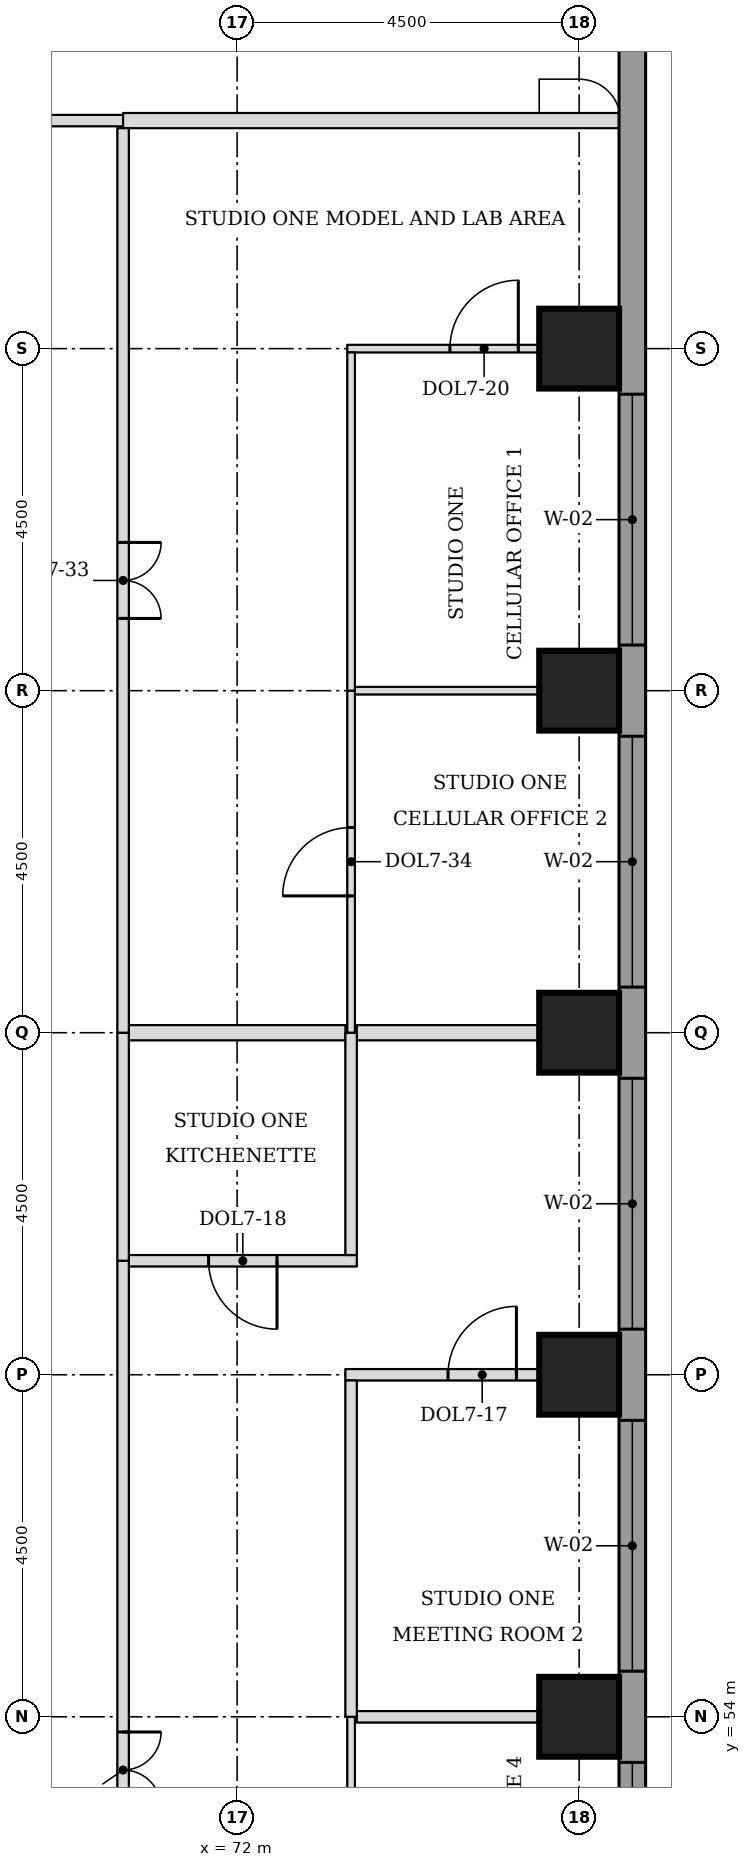
"""IFC4 building model, lengths in metres.
Left out: names, types, materials, properties, quantities, classifications, styles, units other than length and angle.
Written with IfcOpenShell. Run it as: python <this file> out.ifc"""

import sys

from ifc_helpers import new_model, si_unit, direction, frame, frame_2d, origin, origin_2d, place, context, subcontext, project, spatial, rectangle, extrude, element, fill, save


model = new_model("IFC4")
c1 = context("Model", 3, precision=1e-05, world=origin(), true_north=direction((0.0, 1.0)))
c2 = subcontext(c1, "Body", "Model", "MODEL_VIEW")
j1 = project(units=[si_unit("LENGTHUNIT", "METRE"), si_unit("PLANEANGLEUNIT", "RADIAN")], contexts=[c1])
p1 = place(None, origin())
s1 = spatial("IfcSite", under=j1, at=p1, CompositionType="ELEMENT")
p2 = place(p1, origin())
s2 = spatial("IfcBuilding", under=s1, at=p2, CompositionType="ELEMENT")
p3 = place(p2, frame((0.0, 0.0, 130.7)))
s3 = spatial("IfcBuildingStorey", under=s2, at=p3, CompositionType="ELEMENT", Elevation=130.7)
for number, where, z_axis, x_axis in (
    (1, (76.5, 54.0, 0.0), (0.0, 0.0, 1.0), (1.0, 0.0, 0.0)),
    (2, (76.5, 58.5, 0.0), (0.0, 0.0, 1.0), (1.0, 0.0, 0.0)),
    (3, (76.5, 63.0, 0.0), (0.0, 0.0, 1.0), (1.0, 0.0, 0.0)),
    (4, (76.5, 67.5, 0.0), (0.0, 0.0, 1.0), (1.0, 0.0, 0.0)),
    (5, (76.5, 72.0, 0.0), (0.0, 0.0, 1.0), (1.0, 0.0, 0.0)),
):
    element("IfcColumn", number, at=place(p3, frame(where, z_axis=z_axis, x_axis=x_axis)), inside=s3, PredefinedType="COLUMN", context=c2, shape_type="SweptSolid", body=[
        extrude(rectangle(XDim=1.05, YDim=1.05, at=origin_2d()), origin(), (0.0, 0.0, 1.0), 3.7),
    ])
p4 = place(p3, frame((77.2, 44.638, 0.0), z_axis=(0.0, 0.0, 1.0), x_axis=(0.0, 1.0, 0.0)))
e6 = element("IfcWall", 6, at=p4, inside=s3, PredefinedType="STANDARD", context=c2, shape_type="SweptSolid", body=[
    extrude(rectangle(XDim=32.225, YDim=0.35, at=frame_2d((16.112, 0.0))), origin(), (0.0, 0.0, 1.0), 3.525),
])
p5 = place(p4, frame((5.462, 0.0, 0.9)))
e7 = element("IfcOpeningElement", 7, at=p5, cuts=e6, PredefinedType="OPENING", context=c2, shape_type="SweptSolid", body=[
    extrude(rectangle(XDim=3.3, YDim=1.9, at=frame_2d((1.65, 0.95))), frame((0.0, 0.185, 0.0), z_axis=(0.0, -1.0, 0.0), x_axis=(1.0, 0.0, 0.0)), (0.0, 0.0, 1.0), 0.37),
])
p6 = place(p4, frame((9.962, 0.0, 0.9)))
e8 = element("IfcOpeningElement", 8, at=p6, cuts=e6, PredefinedType="OPENING", context=c2, shape_type="SweptSolid", body=[
    extrude(rectangle(XDim=3.3, YDim=1.9, at=frame_2d((1.65, 0.95))), frame((0.0, 0.185, 0.0), z_axis=(0.0, -1.0, 0.0), x_axis=(1.0, 0.0, 0.0)), (0.0, 0.0, 1.0), 0.37),
])
p7 = place(p4, frame((14.462, 0.0, 0.9)))
e9 = element("IfcOpeningElement", 9, at=p7, cuts=e6, PredefinedType="OPENING", context=c2, shape_type="SweptSolid", body=[
    extrude(rectangle(XDim=3.3, YDim=1.9, at=frame_2d((1.65, 0.95))), frame((0.0, 0.185, 0.0), z_axis=(0.0, -1.0, 0.0), x_axis=(1.0, 0.0, 0.0)), (0.0, 0.0, 1.0), 0.37),
])
p8 = place(p4, frame((18.962, 0.0, 0.9)))
e10 = element("IfcOpeningElement", 10, at=p8, cuts=e6, PredefinedType="OPENING", context=c2, shape_type="SweptSolid", body=[
    extrude(rectangle(XDim=3.3, YDim=1.9, at=frame_2d((1.65, 0.95))), frame((0.0, 0.185, 0.0), z_axis=(0.0, -1.0, 0.0), x_axis=(1.0, 0.0, 0.0)), (0.0, 0.0, 1.0), 0.37),
])
p9 = place(p4, frame((23.462, 0.0, 0.9)))
e11 = element("IfcOpeningElement", 11, at=p9, cuts=e6, PredefinedType="OPENING", context=c2, shape_type="SweptSolid", body=[
    extrude(rectangle(XDim=3.3, YDim=1.9, at=frame_2d((1.65, 0.95))), frame((0.0, 0.185, 0.0), z_axis=(0.0, -1.0, 0.0), x_axis=(1.0, 0.0, 0.0)), (0.0, 0.0, 1.0), 0.37),
])
p10 = place(p3, frame((73.575, 54.0, 0.0), z_axis=(0.0, 0.0, 1.0), x_axis=(1.0, 0.0, 0.0)))
e12 = element("IfcWall", 12, at=p10, inside=s3, PredefinedType="PARTITIONING", context=c2, shape_type="SweptSolid", body=[
    extrude(rectangle(XDim=3.45, YDim=0.15, at=frame_2d((1.725, 0.0))), origin(), (0.0, 0.0, 1.0), 3.55),
])
p11 = place(p3, frame((73.425, 58.5, 0.0), z_axis=(0.0, 0.0, 1.0), x_axis=(1.0, 0.0, 0.0)))
e13 = element("IfcWall", 13, at=p11, inside=s3, PredefinedType="PARTITIONING", context=c2, shape_type="SweptSolid", body=[
    extrude(rectangle(XDim=3.6, YDim=0.15, at=frame_2d((1.8, 0.0))), origin(), (0.0, 0.0, 1.0), 3.55),
])
p12 = place(p11, frame((1.35, 0.0, 0.0)))
e14 = element("IfcOpeningElement", 14, at=p12, cuts=e13, PredefinedType="OPENING", context=c2, shape_type="SweptSolid", body=[
    extrude(rectangle(XDim=0.9, YDim=2.1, at=frame_2d((0.45, 1.05))), frame((0.0, 0.085, 0.0), z_axis=(0.0, -1.0, 0.0), x_axis=(1.0, 0.0, 0.0)), (0.0, 0.0, 1.0), 0.17),
])
p13 = place(p3, frame((70.575, 60.0, 0.0), z_axis=(0.0, 0.0, 1.0), x_axis=(1.0, 0.0, 0.0)))
e15 = element("IfcWall", 15, at=p13, inside=s3, PredefinedType="PARTITIONING", context=c2, shape_type="SweptSolid", body=[
    extrude(rectangle(XDim=3.0, YDim=0.15, at=frame_2d((1.5, 0.0))), origin(), (0.0, 0.0, 1.0), 3.55),
])
p14 = place(p13, frame((1.05, 0.0, 0.0)))
e16 = element("IfcOpeningElement", 16, at=p14, cuts=e15, PredefinedType="OPENING", context=c2, shape_type="SweptSolid", body=[
    extrude(rectangle(XDim=0.9, YDim=2.1, at=frame_2d((0.45, 1.05))), frame((0.0, 0.085, 0.0), z_axis=(0.0, -1.0, 0.0), x_axis=(1.0, 0.0, 0.0)), (0.0, 0.0, 1.0), 0.17),
])
p15 = place(p3, frame((70.575, 63.0, 0.0), z_axis=(0.0, 0.0, 1.0), x_axis=(1.0, 0.0, 0.0)))
e17 = element("IfcWall", 17, at=p15, inside=s3, PredefinedType="PARTITIONING", context=c2, shape_type="SweptSolid", body=[
    extrude(rectangle(XDim=2.85, YDim=0.2, at=frame_2d((1.425, 0.0))), origin(), (0.0, 0.0, 1.0), 3.55),
])
p16 = place(p3, frame((73.575, 63.0, 0.0), z_axis=(0.0, 0.0, 1.0), x_axis=(1.0, 0.0, 0.0)))
e18 = element("IfcWall", 18, at=p16, inside=s3, PredefinedType="PARTITIONING", context=c2, shape_type="SweptSolid", body=[
    extrude(rectangle(XDim=3.45, YDim=0.2, at=frame_2d((1.725, 0.0))), origin(), (0.0, 0.0, 1.0), 3.55),
])
p17 = place(p3, frame((73.55, 67.5, 0.0), z_axis=(0.0, 0.0, 1.0), x_axis=(1.0, 0.0, 0.0)))
e19 = element("IfcWall", 19, at=p17, inside=s3, PredefinedType="PARTITIONING", context=c2, shape_type="SweptSolid", body=[
    extrude(rectangle(XDim=3.475, YDim=0.1, at=frame_2d((1.737, 0.0))), origin(), (0.0, 0.0, 1.0), 3.55),
])
p18 = place(p3, frame((73.45, 72.0, 0.0), z_axis=(0.0, 0.0, 1.0), x_axis=(1.0, 0.0, 0.0)))
e20 = element("IfcWall", 20, at=p18, inside=s3, PredefinedType="PARTITIONING", context=c2, shape_type="SweptSolid", body=[
    extrude(rectangle(XDim=3.575, YDim=0.1, at=frame_2d((1.788, 0.0))), origin(), (0.0, 0.0, 1.0), 3.55),
])
p19 = place(p18, frame((1.35, 0.0, 0.0)))
e21 = element("IfcOpeningElement", 21, at=p19, cuts=e20, PredefinedType="OPENING", context=c2, shape_type="SweptSolid", body=[
    extrude(rectangle(XDim=0.9, YDim=2.1, at=frame_2d((0.45, 1.05))), frame((0.0, 0.06, 0.0), z_axis=(0.0, -1.0, 0.0), x_axis=(1.0, 0.0, 0.0)), (0.0, 0.0, 1.0), 0.12),
])
p20 = place(p3, frame((58.5, 75.0, 0.0), z_axis=(0.0, 0.0, 1.0), x_axis=(1.0, 0.0, 0.0)))
e22 = element("IfcWall", 22, at=p20, inside=s3, PredefinedType="PARTITIONING", context=c2, shape_type="SweptSolid", body=[
    extrude(rectangle(XDim=12.0, YDim=0.15, at=frame_2d((6.0, 0.0))), origin(), (0.0, 0.0, 1.0), 3.55),
])
p21 = place(p20, frame((5.5, 0.0, 0.0)))
e23 = element("IfcOpeningElement", 23, at=p21, cuts=e22, PredefinedType="OPENING", context=c2, shape_type="SweptSolid", body=[
    extrude(rectangle(XDim=1.0, YDim=2.1, at=frame_2d((0.5, 1.05))), frame((0.0, 0.085, 0.0), z_axis=(0.0, -1.0, 0.0), x_axis=(1.0, 0.0, 0.0)), (0.0, 0.0, 1.0), 0.17),
])
p22 = place(p3, frame((70.5, 75.0, 0.0), z_axis=(0.0, 0.0, 1.0), x_axis=(1.0, 0.0, 0.0)))
e24 = element("IfcWall", 24, at=p22, inside=s3, PredefinedType="PARTITIONING", context=c2, shape_type="SweptSolid", body=[
    extrude(rectangle(XDim=6.525, YDim=0.2, at=frame_2d((3.262, 0.0))), origin(), (0.0, 0.0, 1.0), 3.55),
])
p23 = place(p3, frame((70.5, 46.6, 0.0), z_axis=(0.0, 0.0, 1.0), x_axis=(0.0, 1.0, 0.0)))
e25 = element("IfcWall", 25, at=p23, inside=s3, PredefinedType="PARTITIONING", context=c2, shape_type="SweptSolid", body=[
    extrude(rectangle(XDim=13.4, YDim=0.15, at=frame_2d((6.7, 0.0))), origin(), (0.0, 0.0, 1.0), 3.55),
])
p24 = place(p23, frame((6.2, 0.0, 0.0)))
e26 = element("IfcOpeningElement", 26, at=p24, cuts=e25, PredefinedType="OPENING", context=c2, shape_type="SweptSolid", body=[
    extrude(rectangle(XDim=1.0, YDim=2.1, at=frame_2d((0.5, 1.05))), frame((0.0, 0.085, 0.0), z_axis=(0.0, -1.0, 0.0), x_axis=(1.0, 0.0, 0.0)), (0.0, 0.0, 1.0), 0.17),
])
p25 = place(p3, frame((73.5, 49.55, 0.0), z_axis=(0.0, 0.0, 1.0), x_axis=(0.0, 1.0, 0.0)))
e27 = element("IfcWall", 27, at=p25, inside=s3, PredefinedType="PARTITIONING", context=c2, shape_type="SweptSolid", body=[
    extrude(rectangle(XDim=4.45, YDim=0.1, at=frame_2d((2.225, 0.0))), origin(), (0.0, 0.0, 1.0), 3.55),
])
p26 = place(p3, frame((73.5, 54.0, 0.0), z_axis=(0.0, 0.0, 1.0), x_axis=(0.0, 1.0, 0.0)))
e28 = element("IfcWall", 28, at=p26, inside=s3, PredefinedType="PARTITIONING", context=c2, shape_type="SweptSolid", body=[
    extrude(rectangle(XDim=4.425, YDim=0.15, at=frame_2d((2.212, 0.0))), origin(), (0.0, 0.0, 1.0), 3.55),
])
p27 = place(p3, frame((70.5, 60.0, 0.0), z_axis=(0.0, 0.0, 1.0), x_axis=(0.0, 1.0, 0.0)))
e29 = element("IfcWall", 29, at=p27, inside=s3, PredefinedType="PARTITIONING", context=c2, shape_type="SweptSolid", body=[
    extrude(rectangle(XDim=3.0, YDim=0.15, at=frame_2d((1.5, 0.0))), origin(), (0.0, 0.0, 1.0), 3.55),
])
p28 = place(p3, frame((73.5, 60.075, 0.0), z_axis=(0.0, 0.0, 1.0), x_axis=(0.0, 1.0, 0.0)))
e30 = element("IfcWall", 30, at=p28, inside=s3, PredefinedType="PARTITIONING", context=c2, shape_type="SweptSolid", body=[
    extrude(rectangle(XDim=2.925, YDim=0.15, at=frame_2d((1.462, 0.0))), origin(), (0.0, 0.0, 1.0), 3.55),
])
p29 = place(p3, frame((70.5, 63.0, 0.0), z_axis=(0.0, 0.0, 1.0), x_axis=(0.0, 1.0, 0.0)))
e31 = element("IfcWall", 31, at=p29, inside=s3, PredefinedType="PARTITIONING", context=c2, shape_type="SweptSolid", body=[
    extrude(rectangle(XDim=11.9, YDim=0.15, at=frame_2d((5.95, 0.0))), origin(), (0.0, 0.0, 1.0), 3.55),
])
p30 = place(p29, frame((5.45, 0.0, 0.0)))
e32 = element("IfcOpeningElement", 32, at=p30, cuts=e31, PredefinedType="OPENING", context=c2, shape_type="SweptSolid", body=[
    extrude(rectangle(XDim=1.0, YDim=2.1, at=frame_2d((0.5, 1.05))), frame((0.0, 0.085, 0.0), z_axis=(0.0, -1.0, 0.0), x_axis=(1.0, 0.0, 0.0)), (0.0, 0.0, 1.0), 0.17),
])
p31 = place(p3, frame((73.5, 63.0, 0.0), z_axis=(0.0, 0.0, 1.0), x_axis=(0.0, 1.0, 0.0)))
e33 = element("IfcWall", 33, at=p31, inside=s3, PredefinedType="PARTITIONING", context=c2, shape_type="SweptSolid", body=[
    extrude(rectangle(XDim=4.5, YDim=0.1, at=frame_2d((2.25, 0.0))), origin(), (0.0, 0.0, 1.0), 3.55),
])
p32 = place(p31, frame((1.8, 0.0, 0.0)))
e34 = element("IfcOpeningElement", 34, at=p32, cuts=e33, PredefinedType="OPENING", context=c2, shape_type="SweptSolid", body=[
    extrude(rectangle(XDim=0.9, YDim=2.1, at=frame_2d((0.45, 1.05))), frame((0.0, 0.06, 0.0), z_axis=(0.0, -1.0, 0.0), x_axis=(1.0, 0.0, 0.0)), (0.0, 0.0, 1.0), 0.12),
])
p33 = place(p3, frame((73.5, 67.5, 0.0), z_axis=(0.0, 0.0, 1.0), x_axis=(0.0, 1.0, 0.0)))
e35 = element("IfcWall", 35, at=p33, inside=s3, PredefinedType="PARTITIONING", context=c2, shape_type="SweptSolid", body=[
    extrude(rectangle(XDim=4.45, YDim=0.1, at=frame_2d((2.225, 0.0))), origin(), (0.0, 0.0, 1.0), 3.55),
])
p34 = place(p5, origin())
e36 = element("IfcWindow", 36, at=p34, inside=s3, PartitioningType="SINGLE_PANEL", PredefinedType="WINDOW", context=c2, shape_type="SweptSolid", body=[
    extrude(rectangle(XDim=3.3, YDim=1.9, at=frame_2d((1.65, 0.95))), frame((0.0, 0.085, 0.0), z_axis=(0.0, -1.0, 0.0), x_axis=(1.0, 0.0, 0.0)), (0.0, 0.0, 1.0), 0.06),
])
fill(e7, e36)
p35 = place(p6, origin())
e37 = element("IfcWindow", 37, at=p35, inside=s3, PartitioningType="SINGLE_PANEL", PredefinedType="WINDOW", context=c2, shape_type="SweptSolid", body=[
    extrude(rectangle(XDim=3.3, YDim=1.9, at=frame_2d((1.65, 0.95))), frame((0.0, 0.085, 0.0), z_axis=(0.0, -1.0, 0.0), x_axis=(1.0, 0.0, 0.0)), (0.0, 0.0, 1.0), 0.06),
])
fill(e8, e37)
p36 = place(p7, origin())
e38 = element("IfcWindow", 38, at=p36, inside=s3, PartitioningType="SINGLE_PANEL", PredefinedType="WINDOW", context=c2, shape_type="SweptSolid", body=[
    extrude(rectangle(XDim=3.3, YDim=1.9, at=frame_2d((1.65, 0.95))), frame((0.0, 0.085, 0.0), z_axis=(0.0, -1.0, 0.0), x_axis=(1.0, 0.0, 0.0)), (0.0, 0.0, 1.0), 0.06),
])
fill(e9, e38)
p37 = place(p8, origin())
e39 = element("IfcWindow", 39, at=p37, inside=s3, PartitioningType="SINGLE_PANEL", PredefinedType="WINDOW", context=c2, shape_type="SweptSolid", body=[
    extrude(rectangle(XDim=3.3, YDim=1.9, at=frame_2d((1.65, 0.95))), frame((0.0, 0.085, 0.0), z_axis=(0.0, -1.0, 0.0), x_axis=(1.0, 0.0, 0.0)), (0.0, 0.0, 1.0), 0.06),
])
fill(e10, e39)
p38 = place(p9, origin())
e40 = element("IfcWindow", 40, at=p38, inside=s3, PartitioningType="SINGLE_PANEL", PredefinedType="WINDOW", context=c2, shape_type="SweptSolid", body=[
    extrude(rectangle(XDim=3.3, YDim=1.9, at=frame_2d((1.65, 0.95))), frame((0.0, 0.085, 0.0), z_axis=(0.0, -1.0, 0.0), x_axis=(1.0, 0.0, 0.0)), (0.0, 0.0, 1.0), 0.06),
])
fill(e11, e40)
p39 = place(p24, frame((1.0, 0.0, 0.0), z_axis=(0.0, 0.0, 1.0), x_axis=(-1.0, 0.0, 0.0)))
e41 = element("IfcDoor", 41, at=p39, inside=s3, OperationType="DOUBLE_DOOR_SINGLE_SWING", PredefinedType="DOOR", context=c2, shape_type="SweptSolid", body=[
    extrude(rectangle(XDim=1.0, YDim=2.1, at=frame_2d((0.5, 1.05))), frame((0.0, 0.025, 0.0), z_axis=(0.0, -1.0, 0.0), x_axis=(1.0, 0.0, 0.0)), (0.0, 0.0, 1.0), 0.05),
])
fill(e26, e41)
p40 = place(p14, frame((0.9, 0.0, 0.0), z_axis=(0.0, 0.0, 1.0), x_axis=(-1.0, 0.0, 0.0)))
e42 = element("IfcDoor", 42, at=p40, inside=s3, OperationType="SINGLE_SWING_LEFT", PredefinedType="DOOR", context=c2, shape_type="SweptSolid", body=[
    extrude(rectangle(XDim=0.9, YDim=2.1, at=frame_2d((0.45, 1.05))), frame((0.0, 0.025, 0.0), z_axis=(0.0, -1.0, 0.0), x_axis=(1.0, 0.0, 0.0)), (0.0, 0.0, 1.0), 0.05),
])
fill(e16, e42)
p41 = place(p12, origin())
e43 = element("IfcDoor", 43, at=p41, inside=s3, OperationType="SINGLE_SWING_RIGHT", PredefinedType="DOOR", context=c2, shape_type="SweptSolid", body=[
    extrude(rectangle(XDim=0.9, YDim=2.1, at=frame_2d((0.45, 1.05))), frame((0.0, 0.025, 0.0), z_axis=(0.0, -1.0, 0.0), x_axis=(1.0, 0.0, 0.0)), (0.0, 0.0, 1.0), 0.05),
])
fill(e14, e43)
p42 = place(p30, frame((1.0, 0.0, 0.0), z_axis=(0.0, 0.0, 1.0), x_axis=(-1.0, 0.0, 0.0)))
e44 = element("IfcDoor", 44, at=p42, inside=s3, OperationType="DOUBLE_DOOR_SINGLE_SWING", PredefinedType="DOOR", context=c2, shape_type="SweptSolid", body=[
    extrude(rectangle(XDim=1.0, YDim=2.1, at=frame_2d((0.5, 1.05))), frame((0.0, 0.025, 0.0), z_axis=(0.0, -1.0, 0.0), x_axis=(1.0, 0.0, 0.0)), (0.0, 0.0, 1.0), 0.05),
])
fill(e32, e44)
p43 = place(p32, origin())
e45 = element("IfcDoor", 45, at=p43, inside=s3, OperationType="SINGLE_SWING_LEFT", PredefinedType="DOOR", context=c2, shape_type="SweptSolid", body=[
    extrude(rectangle(XDim=0.9, YDim=2.1, at=frame_2d((0.45, 1.05))), frame((0.0, 0.025, 0.0), z_axis=(0.0, -1.0, 0.0), x_axis=(1.0, 0.0, 0.0)), (0.0, 0.0, 1.0), 0.05),
])
fill(e34, e45)
p44 = place(p19, origin())
e46 = element("IfcDoor", 46, at=p44, inside=s3, OperationType="SINGLE_SWING_RIGHT", PredefinedType="DOOR", context=c2, shape_type="SweptSolid", body=[
    extrude(rectangle(XDim=0.9, YDim=2.1, at=frame_2d((0.45, 1.05))), frame((0.0, 0.025, 0.0), z_axis=(0.0, -1.0, 0.0), x_axis=(1.0, 0.0, 0.0)), (0.0, 0.0, 1.0), 0.05),
])
fill(e21, e46)
save(model, sys.argv[1])
